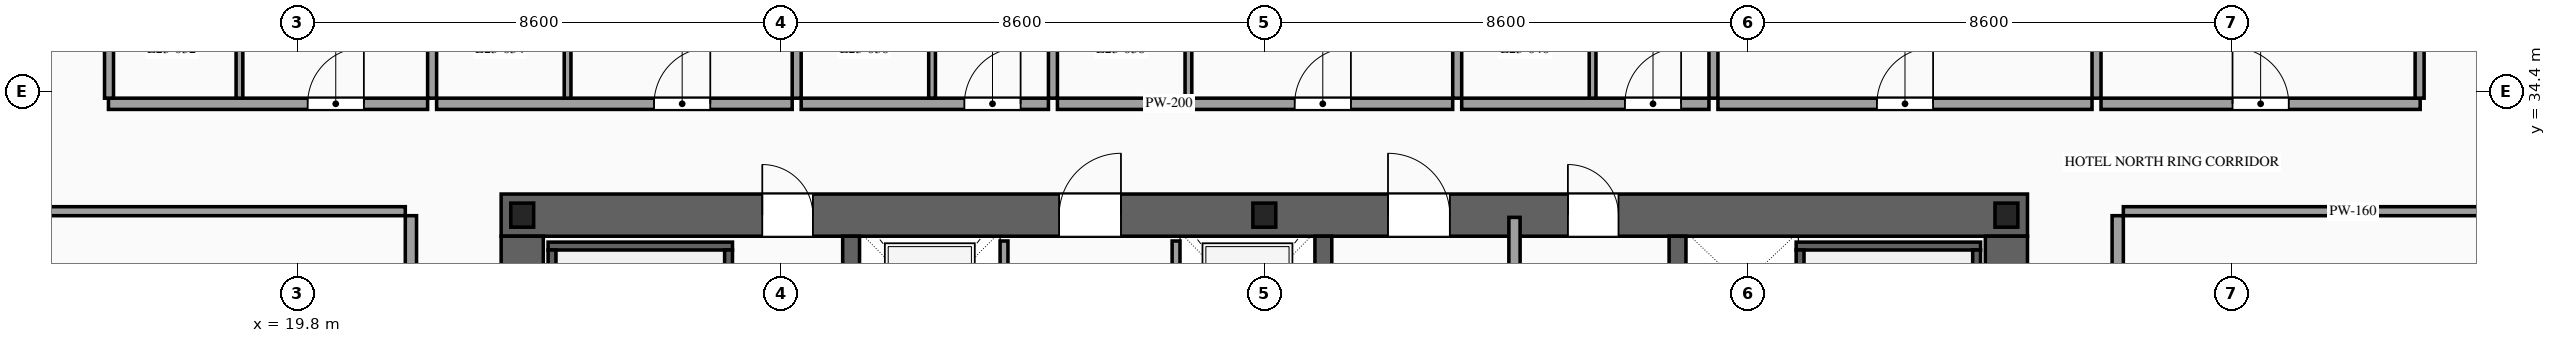
"""IFC4 building model, lengths in metres.
Left out: names, types, materials, properties, quantities, classifications, styles, units other than length and angle.
Written with IfcOpenShell. Run it as: python <this file> out.ifc"""

import sys

from ifc_helpers import new_model, si_unit, direction, frame, frame_2d, origin, origin_2d, place, context, subcontext, project, spatial, rectangle, i_section, extrude, source, transform, mapped, element, fill, save


model = new_model("IFC4")
c1 = context("Model", 3, precision=1e-05, world=origin(), true_north=direction((0.0, 1.0)))
c2 = subcontext(c1, "Body", "Model", "MODEL_VIEW")
j1 = project(units=[si_unit("LENGTHUNIT", "METRE"), si_unit("PLANEANGLEUNIT", "RADIAN")], contexts=[c1])
p1 = place(None, origin())
s1 = spatial("IfcSite", under=j1, at=p1, CompositionType="ELEMENT")
p2 = place(p1, origin())
s2 = spatial("IfcBuilding", under=s1, at=p2, CompositionType="ELEMENT")
p3 = place(p2, frame((0.0, 0.0, 90.2)))
s3 = spatial("IfcBuildingStorey", under=s2, at=p3, CompositionType="ELEMENT", Elevation=90.2)
p4 = place(p3, frame((23.425, 32.2, 0.0), z_axis=(0.0, 0.0, 1.0), x_axis=(1.0, 0.0, 0.0)))
e1 = element("IfcWall", 1, at=p4, inside=s3, PredefinedType="SHEAR", context=c2, shape_type="SweptSolid", body=[
    extrude(rectangle(XDim=27.15, YDim=0.75, at=frame_2d((13.575, 0.0))), origin(), (0.0, 0.0, 1.0), 3.6),
])
p5 = place(p4, frame((4.645, 0.0, 0.0)))
e2 = element("IfcOpeningElement", 2, at=p5, cuts=e1, PredefinedType="OPENING", context=c2, shape_type="SweptSolid", body=[
    extrude(rectangle(XDim=0.9, YDim=2.15, at=frame_2d((0.45, 1.075))), frame((0.0, 0.39, 0.0), z_axis=(0.0, -1.0, 0.0), x_axis=(1.0, 0.0, 0.0)), (0.0, 0.0, 1.0), 0.78),
])
p6 = place(p4, frame((9.925, 0.0, 0.0)))
e3 = element("IfcOpeningElement", 3, at=p6, cuts=e1, PredefinedType="OPENING", context=c2, shape_type="SweptSolid", body=[
    extrude(rectangle(XDim=1.1, YDim=2.2, at=frame_2d((0.55, 1.1))), frame((0.0, 0.39, 0.0), z_axis=(0.0, -1.0, 0.0), x_axis=(1.0, 0.0, 0.0)), (0.0, 0.0, 1.0), 0.78),
])
p7 = place(p4, frame((15.775, 0.0, 0.0)))
e4 = element("IfcOpeningElement", 4, at=p7, cuts=e1, PredefinedType="OPENING", context=c2, shape_type="SweptSolid", body=[
    extrude(rectangle(XDim=1.1, YDim=2.2, at=frame_2d((0.55, 1.1))), frame((0.0, 0.39, 0.0), z_axis=(0.0, -1.0, 0.0), x_axis=(1.0, 0.0, 0.0)), (0.0, 0.0, 1.0), 0.78),
])
p8 = place(p4, frame((18.975, 0.0, 0.0)))
e5 = element("IfcOpeningElement", 5, at=p8, cuts=e1, PredefinedType="OPENING", context=c2, shape_type="SweptSolid", body=[
    extrude(rectangle(XDim=0.9, YDim=2.15, at=frame_2d((0.45, 1.075))), frame((0.0, 0.39, 0.0), z_axis=(0.0, -1.0, 0.0), x_axis=(1.0, 0.0, 0.0)), (0.0, 0.0, 1.0), 0.78),
])
m1 = source(origin(), c2, "Body", "SweptSolid", [
    extrude(rectangle(XDim=12.05, YDim=0.75, at=frame_2d((6.025, 0.0))), origin(), (0.0, 0.0, 1.0), 3.6),
])
for number, where, z_axis, x_axis in (
    (6, (23.8, 19.775, 0.0), (0.0, 0.0, 1.0), (0.0, 1.0, 0.0)),
    (7, (50.2, 19.775, 0.0), (0.0, 0.0, 1.0), (0.0, 1.0, 0.0)),
):
    element("IfcWall", number, at=place(p3, frame(where, z_axis=z_axis, x_axis=x_axis)), inside=s3, PredefinedType="SHEAR", context=c2, shape_type="MappedRepresentation", body=[
        mapped(m1, transform((0.0, 0.0, 0.0), scale=1.0)),
    ])
m2 = source(origin(), c2, "Body", "SweptSolid", [
    extrude(rectangle(XDim=12.05, YDim=0.3, at=frame_2d((6.025, 0.0))), origin(), (0.0, 0.0, 1.0), 3.6),
])
for number, where, z_axis, x_axis in (
    (8, (29.65, 19.775, 0.0), (0.0, 0.0, 1.0), (0.0, 1.0, 0.0)),
    (9, (38.05, 19.775, 0.0), (0.0, 0.0, 1.0), (0.0, 1.0, 0.0)),
    (10, (44.35, 19.775, 0.0), (0.0, 0.0, 1.0), (0.0, 1.0, 0.0)),
):
    element("IfcWall", number, at=place(p3, frame(where, z_axis=z_axis, x_axis=x_axis)), inside=s3, PredefinedType="SOLIDWALL", context=c2, shape_type="MappedRepresentation", body=[
        mapped(m2, transform((0.0, 0.0, 0.0), scale=1.0)),
    ])
m3 = source(origin(), c2, "Body", "SweptSolid", [
    extrude(i_section(OverallWidth=0.407, OverallDepth=0.428, WebThickness=0.02, FlangeThickness=0.035, at=origin_2d()), origin(), (0.0, 0.0, 1.0), 3.6),
])
for number, where, z_axis, x_axis in (
    (11, (23.8, 32.2, 0.0), (0.0, 0.0, 1.0), (1.0, 0.0, 0.0)),
    (12, (37.0, 32.2, 0.0), (0.0, 0.0, 1.0), (1.0, 0.0, 0.0)),
    (13, (50.2, 32.2, 0.0), (0.0, 0.0, 1.0), (1.0, 0.0, 0.0)),
):
    element("IfcColumn", number, at=place(p3, frame(where, z_axis=z_axis, x_axis=x_axis)), inside=s3, PredefinedType="COLUMN", context=c2, shape_type="MappedRepresentation", body=[
        mapped(m3, transform((0.0, 0.0, 0.0), scale=1.0)),
    ])
p9 = place(p3, frame((32.37, 29.4, 0.0), z_axis=(0.0, 0.0, 1.0), x_axis=(0.0, 1.0, 0.0)))
e14 = element("IfcWall", 14, at=p9, inside=s3, PredefinedType="SOLIDWALL", context=c2, shape_type="SweptSolid", body=[
    extrude(rectangle(XDim=2.34, YDim=0.14, at=frame_2d((1.17, 0.0))), origin(), (0.0, 0.0, 1.0), 3.38),
])
p10 = place(p9, frame((0.62, 0.0, 0.0)))
e15 = element("IfcOpeningElement", 15, at=p10, cuts=e14, PredefinedType="OPENING", context=c2, shape_type="SweptSolid", body=[
    extrude(rectangle(XDim=1.1, YDim=2.2, at=frame_2d((0.55, 1.1))), frame((0.0, 0.085, 0.0), z_axis=(0.0, -1.0, 0.0), x_axis=(1.0, 0.0, 0.0)), (0.0, 0.0, 1.0), 0.17),
])
p11 = place(p3, frame((35.43, 29.4, 0.0), z_axis=(0.0, 0.0, 1.0), x_axis=(0.0, 1.0, 0.0)))
e16 = element("IfcWall", 16, at=p11, inside=s3, PredefinedType="SOLIDWALL", context=c2, shape_type="SweptSolid", body=[
    extrude(rectangle(XDim=2.34, YDim=0.14, at=frame_2d((1.17, 0.0))), origin(), (0.0, 0.0, 1.0), 3.38),
])
p12 = place(p11, frame((0.62, 0.0, 0.0)))
e17 = element("IfcOpeningElement", 17, at=p12, cuts=e16, PredefinedType="OPENING", context=c2, shape_type="SweptSolid", body=[
    extrude(rectangle(XDim=1.1, YDim=2.2, at=frame_2d((0.55, 1.1))), frame((0.0, 0.085, 0.0), z_axis=(0.0, -1.0, 0.0), x_axis=(1.0, 0.0, 0.0)), (0.0, 0.0, 1.0), 0.17),
])
m4 = source(origin(), c2, "Body", "SweptSolid", [
    extrude(rectangle(XDim=3.28, YDim=0.14, at=frame_2d((1.64, 0.0))), origin(), (0.0, 0.0, 1.0), 3.38),
])
p13 = place(p3, frame((24.26, 31.65, 0.0), z_axis=(0.0, 0.0, 1.0), x_axis=(1.0, 0.0, 0.0)))
e18 = element("IfcWall", 18, at=p13, inside=s3, PredefinedType="SOLIDWALL", context=c2, shape_type="MappedRepresentation", body=[
    mapped(m4, transform((0.0, 0.0, 0.0), scale=1.0)),
])
m5 = source(origin(), c2, "Body", "SweptSolid", [
    extrude(rectangle(XDim=8.94, YDim=0.14, at=frame_2d((4.47, 0.0))), origin(), (0.0, 0.0, 1.0), 3.38),
])
for number, where, z_axis, x_axis in (
    (19, (24.33, 22.64, 0.0), (0.0, 0.0, 1.0), (0.0, 1.0, 0.0)),
    (20, (27.47, 22.64, 0.0), (0.0, 0.0, 1.0), (0.0, 1.0, 0.0)),
):
    element("IfcWall", number, at=place(p3, frame(where, z_axis=z_axis, x_axis=x_axis)), inside=s3, PredefinedType="SOLIDWALL", context=c2, shape_type="MappedRepresentation", body=[
        mapped(m5, transform((0.0, 0.0, 0.0), scale=1.0)),
    ])
p14 = place(p3, frame((46.46, 31.65, 0.0), z_axis=(0.0, 0.0, 1.0), x_axis=(1.0, 0.0, 0.0)))
e21 = element("IfcWall", 21, at=p14, inside=s3, PredefinedType="SOLIDWALL", context=c2, shape_type="MappedRepresentation", body=[
    mapped(m4, transform((0.0, 0.0, 0.0), scale=1.0)),
])
for number, where, z_axis, x_axis in (
    (22, (46.53, 22.64, 0.0), (0.0, 0.0, 1.0), (0.0, 1.0, 0.0)),
    (23, (49.67, 22.64, 0.0), (0.0, 0.0, 1.0), (0.0, 1.0, 0.0)),
):
    element("IfcWall", number, at=place(p3, frame(where, z_axis=z_axis, x_axis=x_axis)), inside=s3, PredefinedType="SOLIDWALL", context=c2, shape_type="MappedRepresentation", body=[
        mapped(m5, transform((0.0, 0.0, 0.0), scale=1.0)),
    ])
m6 = source(origin(), c2, "Body", "SweptSolid", [
    extrude(rectangle(XDim=5.96, YDim=0.2, at=frame_2d((2.98, 0.0))), origin(), (0.0, 0.0, 1.0), 3.38),
])
p15 = place(p3, frame((41.45, 26.2, 0.0), z_axis=(0.0, 0.0, 1.0), x_axis=(0.0, 1.0, 0.0)))
e24 = element("IfcWall", 24, at=p15, inside=s3, PredefinedType="PARTITIONING", context=c2, shape_type="MappedRepresentation", body=[
    mapped(m6, transform((0.0, 0.0, 0.0), scale=1.0)),
])
p16 = place(p3, frame((16.44, 34.18, 0.0), z_axis=(0.0, 0.0, 1.0), x_axis=(1.0, 0.0, 0.0)))
e25 = element("IfcWall", 25, at=p16, inside=s3, PredefinedType="PARTITIONING", context=c2, shape_type="SweptSolid", body=[
    extrude(rectangle(XDim=5.677, YDim=0.2, at=frame_2d((2.838, 0.0))), origin(), (0.0, 0.0, 1.0), 3.38),
])
p17 = place(p16, frame((3.543, 0.0, 0.0)))
e26 = element("IfcOpeningElement", 26, at=p17, cuts=e25, PredefinedType="OPENING", context=c2, shape_type="SweptSolid", body=[
    extrude(rectangle(XDim=1.0, YDim=2.2, at=frame_2d((0.5, 1.1))), frame((0.0, 0.115, 0.0), z_axis=(0.0, -1.0, 0.0), x_axis=(1.0, 0.0, 0.0)), (0.0, 0.0, 1.0), 0.23),
])
m7 = source(origin(), c2, "Body", "SweptSolid", [
    extrude(rectangle(XDim=14.97, YDim=0.16, at=frame_2d((7.485, 0.0))), origin(), (0.0, 0.0, 1.0), 3.38),
])
p18 = place(p3, frame((22.197, 34.28, 0.0), z_axis=(0.0, 0.0, 1.0), x_axis=(0.0, 1.0, 0.0)))
e27 = element("IfcWall", 27, at=p18, inside=s3, PredefinedType="PARTITIONING", context=c2, shape_type="MappedRepresentation", body=[
    mapped(m7, transform((0.0, 0.0, 0.0), scale=1.0)),
])
m8 = source(origin(), c2, "Body", "SweptSolid", [
    extrude(rectangle(XDim=2.42, YDim=0.12, at=frame_2d((1.21, 0.0))), origin(), (0.0, 0.0, 1.0), 3.38),
])
p19 = place(p3, frame((18.77, 34.28, 0.0), z_axis=(0.0, 0.0, 1.0), x_axis=(0.0, 1.0, 0.0)))
e28 = element("IfcWall", 28, at=p19, inside=s3, PredefinedType="PARTITIONING", context=c2, shape_type="MappedRepresentation", body=[
    mapped(m8, transform((0.0, 0.0, 0.0), scale=1.0)),
])
p20 = place(p3, frame((22.277, 34.18, 0.0), z_axis=(0.0, 0.0, 1.0), x_axis=(1.0, 0.0, 0.0)))
e29 = element("IfcWall", 29, at=p20, inside=s3, PredefinedType="PARTITIONING", context=c2, shape_type="SweptSolid", body=[
    extrude(rectangle(XDim=6.325, YDim=0.2, at=frame_2d((3.163, 0.0))), origin(), (0.0, 0.0, 1.0), 3.38),
])
p21 = place(p20, frame((3.868, 0.0, 0.0)))
e30 = element("IfcOpeningElement", 30, at=p21, cuts=e29, PredefinedType="OPENING", context=c2, shape_type="SweptSolid", body=[
    extrude(rectangle(XDim=1.0, YDim=2.2, at=frame_2d((0.5, 1.1))), frame((0.0, 0.115, 0.0), z_axis=(0.0, -1.0, 0.0), x_axis=(1.0, 0.0, 0.0)), (0.0, 0.0, 1.0), 0.23),
])
p22 = place(p3, frame((28.682, 34.28, 0.0), z_axis=(0.0, 0.0, 1.0), x_axis=(0.0, 1.0, 0.0)))
e31 = element("IfcWall", 31, at=p22, inside=s3, PredefinedType="PARTITIONING", context=c2, shape_type="MappedRepresentation", body=[
    mapped(m7, transform((0.0, 0.0, 0.0), scale=1.0)),
])
p23 = place(p3, frame((24.607, 34.28, 0.0), z_axis=(0.0, 0.0, 1.0), x_axis=(0.0, 1.0, 0.0)))
e32 = element("IfcWall", 32, at=p23, inside=s3, PredefinedType="PARTITIONING", context=c2, shape_type="MappedRepresentation", body=[
    mapped(m8, transform((0.0, 0.0, 0.0), scale=1.0)),
])
p24 = place(p3, frame((28.762, 34.18, 0.0), z_axis=(0.0, 0.0, 1.0), x_axis=(1.0, 0.0, 0.0)))
e33 = element("IfcWall", 33, at=p24, inside=s3, PredefinedType="PARTITIONING", context=c2, shape_type="SweptSolid", body=[
    extrude(rectangle(XDim=4.398, YDim=0.2, at=frame_2d((2.199, 0.0))), origin(), (0.0, 0.0, 1.0), 3.38),
])
p25 = place(p24, frame((2.903, 0.0, 0.0)))
e34 = element("IfcOpeningElement", 34, at=p25, cuts=e33, PredefinedType="OPENING", context=c2, shape_type="SweptSolid", body=[
    extrude(rectangle(XDim=1.0, YDim=2.2, at=frame_2d((0.5, 1.1))), frame((0.0, 0.115, 0.0), z_axis=(0.0, -1.0, 0.0), x_axis=(1.0, 0.0, 0.0)), (0.0, 0.0, 1.0), 0.23),
])
p26 = place(p3, frame((33.24, 34.28, 0.0), z_axis=(0.0, 0.0, 1.0), x_axis=(0.0, 1.0, 0.0)))
e35 = element("IfcWall", 35, at=p26, inside=s3, PredefinedType="PARTITIONING", context=c2, shape_type="MappedRepresentation", body=[
    mapped(m7, transform((0.0, 0.0, 0.0), scale=1.0)),
])
p27 = place(p3, frame((31.09, 34.28, 0.0), z_axis=(0.0, 0.0, 1.0), x_axis=(0.0, 1.0, 0.0)))
e36 = element("IfcWall", 36, at=p27, inside=s3, PredefinedType="PARTITIONING", context=c2, shape_type="MappedRepresentation", body=[
    mapped(m8, transform((0.0, 0.0, 0.0), scale=1.0)),
])
p28 = place(p3, frame((33.32, 34.18, 0.0), z_axis=(0.0, 0.0, 1.0), x_axis=(1.0, 0.0, 0.0)))
e37 = element("IfcWall", 37, at=p28, inside=s3, PredefinedType="PARTITIONING", context=c2, shape_type="SweptSolid", body=[
    extrude(rectangle(XDim=7.031, YDim=0.2, at=frame_2d((3.516, 0.0))), origin(), (0.0, 0.0, 1.0), 3.38),
])
p29 = place(p28, frame((4.22, 0.0, 0.0)))
e38 = element("IfcOpeningElement", 38, at=p29, cuts=e37, PredefinedType="OPENING", context=c2, shape_type="SweptSolid", body=[
    extrude(rectangle(XDim=1.0, YDim=2.2, at=frame_2d((0.5, 1.1))), frame((0.0, 0.115, 0.0), z_axis=(0.0, -1.0, 0.0), x_axis=(1.0, 0.0, 0.0)), (0.0, 0.0, 1.0), 0.23),
])
p30 = place(p3, frame((40.431, 34.28, 0.0), z_axis=(0.0, 0.0, 1.0), x_axis=(0.0, 1.0, 0.0)))
e39 = element("IfcWall", 39, at=p30, inside=s3, PredefinedType="PARTITIONING", context=c2, shape_type="MappedRepresentation", body=[
    mapped(m7, transform((0.0, 0.0, 0.0), scale=1.0)),
])
p31 = place(p3, frame((35.65, 34.28, 0.0), z_axis=(0.0, 0.0, 1.0), x_axis=(0.0, 1.0, 0.0)))
e40 = element("IfcWall", 40, at=p31, inside=s3, PredefinedType="PARTITIONING", context=c2, shape_type="MappedRepresentation", body=[
    mapped(m8, transform((0.0, 0.0, 0.0), scale=1.0)),
])
p32 = place(p3, frame((40.511, 34.18, 0.0), z_axis=(0.0, 0.0, 1.0), x_axis=(1.0, 0.0, 0.0)))
e41 = element("IfcWall", 41, at=p32, inside=s3, PredefinedType="PARTITIONING", context=c2, shape_type="SweptSolid", body=[
    extrude(rectangle(XDim=4.398, YDim=0.2, at=frame_2d((2.199, 0.0))), origin(), (0.0, 0.0, 1.0), 3.38),
])
p33 = place(p32, frame((2.903, 0.0, 0.0)))
e42 = element("IfcOpeningElement", 42, at=p33, cuts=e41, PredefinedType="OPENING", context=c2, shape_type="SweptSolid", body=[
    extrude(rectangle(XDim=1.0, YDim=2.2, at=frame_2d((0.5, 1.1))), frame((0.0, 0.115, 0.0), z_axis=(0.0, -1.0, 0.0), x_axis=(1.0, 0.0, 0.0)), (0.0, 0.0, 1.0), 0.23),
])
p34 = place(p3, frame((44.989, 34.28, 0.0), z_axis=(0.0, 0.0, 1.0), x_axis=(0.0, 1.0, 0.0)))
e43 = element("IfcWall", 43, at=p34, inside=s3, PredefinedType="PARTITIONING", context=c2, shape_type="MappedRepresentation", body=[
    mapped(m7, transform((0.0, 0.0, 0.0), scale=1.0)),
])
p35 = place(p3, frame((42.839, 34.28, 0.0), z_axis=(0.0, 0.0, 1.0), x_axis=(0.0, 1.0, 0.0)))
e44 = element("IfcWall", 44, at=p35, inside=s3, PredefinedType="PARTITIONING", context=c2, shape_type="MappedRepresentation", body=[
    mapped(m8, transform((0.0, 0.0, 0.0), scale=1.0)),
])
p36 = place(p3, frame((45.069, 34.18, 0.0), z_axis=(0.0, 0.0, 1.0), x_axis=(1.0, 0.0, 0.0)))
e45 = element("IfcWall", 45, at=p36, inside=s3, PredefinedType="PARTITIONING", context=c2, shape_type="SweptSolid", body=[
    extrude(rectangle(XDim=6.654, YDim=0.2, at=frame_2d((3.327, 0.0))), origin(), (0.0, 0.0, 1.0), 3.38),
])
p37 = place(p36, frame((2.827, 0.0, 0.0)))
e46 = element("IfcOpeningElement", 46, at=p37, cuts=e45, PredefinedType="OPENING", context=c2, shape_type="SweptSolid", body=[
    extrude(rectangle(XDim=1.0, YDim=2.2, at=frame_2d((0.5, 1.1))), frame((0.0, 0.115, 0.0), z_axis=(0.0, -1.0, 0.0), x_axis=(1.0, 0.0, 0.0)), (0.0, 0.0, 1.0), 0.23),
])
p38 = place(p3, frame((51.803, 34.28, 0.0), z_axis=(0.0, 0.0, 1.0), x_axis=(0.0, 1.0, 0.0)))
e47 = element("IfcWall", 47, at=p38, inside=s3, PredefinedType="PARTITIONING", context=c2, shape_type="MappedRepresentation", body=[
    mapped(m7, transform((0.0, 0.0, 0.0), scale=1.0)),
])
p39 = place(p3, frame((51.883, 34.18, 0.0), z_axis=(0.0, 0.0, 1.0), x_axis=(1.0, 0.0, 0.0)))
e48 = element("IfcWall", 48, at=p39, inside=s3, PredefinedType="PARTITIONING", context=c2, shape_type="SweptSolid", body=[
    extrude(rectangle(XDim=5.677, YDim=0.2, at=frame_2d((2.838, 0.0))), origin(), (0.0, 0.0, 1.0), 3.38),
])
p40 = place(p39, frame((2.339, 0.0, 0.0)))
e49 = element("IfcOpeningElement", 49, at=p40, cuts=e48, PredefinedType="OPENING", context=c2, shape_type="SweptSolid", body=[
    extrude(rectangle(XDim=1.0, YDim=2.2, at=frame_2d((0.5, 1.1))), frame((0.0, 0.115, 0.0), z_axis=(0.0, -1.0, 0.0), x_axis=(1.0, 0.0, 0.0)), (0.0, 0.0, 1.0), 0.23),
])
m9 = source(origin(), c2, "Body", "SweptSolid", [
    extrude(rectangle(XDim=14.82, YDim=0.16, at=frame_2d((7.41, 0.0))), origin(), (0.0, 0.0, 1.0), 3.38),
])
for number, where, z_axis, x_axis in (
    (50, (16.45, 34.28, 0.0), (0.0, 0.0, 1.0), (0.0, 1.0, 0.0)),
    (51, (57.55, 34.28, 0.0), (0.0, 0.0, 1.0), (0.0, 1.0, 0.0)),
):
    element("IfcWall", number, at=place(p3, frame(where, z_axis=z_axis, x_axis=x_axis)), inside=s3, PredefinedType="PARTITIONING", context=c2, shape_type="MappedRepresentation", body=[
        mapped(m9, transform((0.0, 0.0, 0.0), scale=1.0)),
    ])
p41 = place(p3, frame((21.82, 25.88, 0.0), z_axis=(0.0, 0.0, 1.0), x_axis=(0.0, 1.0, 0.0)))
e52 = element("IfcWall", 52, at=p41, inside=s3, PredefinedType="PARTITIONING", context=c2, shape_type="SweptSolid", body=[
    extrude(rectangle(XDim=6.31, YDim=0.2, at=frame_2d((3.155, 0.0))), origin(), (0.0, 0.0, 1.0), 3.38),
])
p42 = place(p41, frame((3.835, 0.0, 0.0)))
e53 = element("IfcOpeningElement", 53, at=p42, cuts=e52, PredefinedType="OPENING", context=c2, shape_type="SweptSolid", body=[
    extrude(rectangle(XDim=1.0, YDim=2.2, at=frame_2d((0.5, 1.1))), frame((0.0, 0.115, 0.0), z_axis=(0.0, -1.0, 0.0), x_axis=(1.0, 0.0, 0.0)), (0.0, 0.0, 1.0), 0.23),
])
m10 = source(origin(), c2, "Body", "SweptSolid", [
    extrude(rectangle(XDim=8.17, YDim=0.16, at=frame_2d((4.085, 0.0))), origin(), (0.0, 0.0, 1.0), 2.875),
])
p43 = place(p3, frame((13.55, 32.27, 0.0), z_axis=(0.0, 0.0, 1.0), x_axis=(1.0, 0.0, 0.0)))
e54 = element("IfcWall", 54, at=p43, inside=s3, PredefinedType="PARTITIONING", context=c2, shape_type="MappedRepresentation", body=[
    mapped(m10, transform((0.0, 0.0, 0.0), scale=1.0)),
])
p44 = place(p3, frame((52.18, 25.88, 0.0), z_axis=(0.0, 0.0, 1.0), x_axis=(0.0, 1.0, 0.0)))
e55 = element("IfcWall", 55, at=p44, inside=s3, PredefinedType="PARTITIONING", context=c2, shape_type="SweptSolid", body=[
    extrude(rectangle(XDim=6.31, YDim=0.2, at=frame_2d((3.155, 0.0))), origin(), (0.0, 0.0, 1.0), 3.38),
])
p45 = place(p44, frame((3.835, 0.0, 0.0)))
e56 = element("IfcOpeningElement", 56, at=p45, cuts=e55, PredefinedType="OPENING", context=c2, shape_type="SweptSolid", body=[
    extrude(rectangle(XDim=1.0, YDim=2.2, at=frame_2d((0.5, 1.1))), frame((0.0, 0.115, 0.0), z_axis=(0.0, -1.0, 0.0), x_axis=(1.0, 0.0, 0.0)), (0.0, 0.0, 1.0), 0.23),
])
p46 = place(p3, frame((52.28, 32.27, 0.0), z_axis=(0.0, 0.0, 1.0), x_axis=(1.0, 0.0, 0.0)))
e57 = element("IfcWall", 57, at=p46, inside=s3, PredefinedType="PARTITIONING", context=c2, shape_type="MappedRepresentation", body=[
    mapped(m10, transform((0.0, 0.0, 0.0), scale=1.0)),
])
m11 = source(origin(), c2, "Body", "SweptSolid", [
    extrude(rectangle(XDim=0.9, YDim=2.15, at=frame_2d((0.45, 1.075))), frame((0.0, 0.025, 0.0), z_axis=(0.0, -1.0, 0.0), x_axis=(1.0, 0.0, 0.0)), (0.0, 0.0, 1.0), 0.05),
])
p47 = place(p5, origin())
e58 = element("IfcDoor", 58, at=p47, inside=s3, OperationType="SINGLE_SWING_LEFT", PredefinedType="DOOR", context=c2, shape_type="MappedRepresentation", body=[
    mapped(m11, transform((0.0, 0.0, 0.0), scale=1.0)),
])
fill(e2, e58)
m12 = source(origin(), c2, "Body", "SweptSolid", [
    extrude(rectangle(XDim=1.1, YDim=2.2, at=frame_2d((0.55, 1.1))), frame((0.0, 0.025, 0.0), z_axis=(0.0, -1.0, 0.0), x_axis=(1.0, 0.0, 0.0)), (0.0, 0.0, 1.0), 0.05),
])
p48 = place(p6, origin())
e59 = element("IfcDoor", 59, at=p48, inside=s3, OperationType="SINGLE_SWING_RIGHT", PredefinedType="DOOR", context=c2, shape_type="MappedRepresentation", body=[
    mapped(m12, transform((0.0, 0.0, 0.0), scale=1.0)),
])
fill(e3, e59)
p49 = place(p7, origin())
e60 = element("IfcDoor", 60, at=p49, inside=s3, OperationType="SINGLE_SWING_LEFT", PredefinedType="DOOR", context=c2, shape_type="MappedRepresentation", body=[
    mapped(m12, transform((0.0, 0.0, 0.0), scale=1.0)),
])
fill(e4, e60)
p50 = place(p8, origin())
e61 = element("IfcDoor", 61, at=p50, inside=s3, OperationType="SINGLE_SWING_LEFT", PredefinedType="DOOR", context=c2, shape_type="MappedRepresentation", body=[
    mapped(m11, transform((0.0, 0.0, 0.0), scale=1.0)),
])
fill(e5, e61)
m13 = source(origin(), c2, "Body", "SweptSolid", [
    extrude(rectangle(XDim=1.0, YDim=2.2, at=frame_2d((0.5, 1.1))), frame((0.0, 0.025, 0.0), z_axis=(0.0, -1.0, 0.0), x_axis=(1.0, 0.0, 0.0)), (0.0, 0.0, 1.0), 0.05),
])
p51 = place(p17, origin())
e62 = element("IfcDoor", 62, at=p51, inside=s3, OperationType="SINGLE_SWING_RIGHT", PredefinedType="DOOR", context=c2, shape_type="MappedRepresentation", body=[
    mapped(m13, transform((0.0, 0.0, 0.0), scale=1.0)),
])
fill(e26, e62)
p52 = place(p21, origin())
e63 = element("IfcDoor", 63, at=p52, inside=s3, OperationType="SINGLE_SWING_RIGHT", PredefinedType="DOOR", context=c2, shape_type="MappedRepresentation", body=[
    mapped(m13, transform((0.0, 0.0, 0.0), scale=1.0)),
])
fill(e30, e63)
p53 = place(p25, origin())
e64 = element("IfcDoor", 64, at=p53, inside=s3, OperationType="SINGLE_SWING_RIGHT", PredefinedType="DOOR", context=c2, shape_type="MappedRepresentation", body=[
    mapped(m13, transform((0.0, 0.0, 0.0), scale=1.0)),
])
fill(e34, e64)
p54 = place(p29, origin())
e65 = element("IfcDoor", 65, at=p54, inside=s3, OperationType="SINGLE_SWING_RIGHT", PredefinedType="DOOR", context=c2, shape_type="MappedRepresentation", body=[
    mapped(m13, transform((0.0, 0.0, 0.0), scale=1.0)),
])
fill(e38, e65)
p55 = place(p33, origin())
e66 = element("IfcDoor", 66, at=p55, inside=s3, OperationType="SINGLE_SWING_RIGHT", PredefinedType="DOOR", context=c2, shape_type="MappedRepresentation", body=[
    mapped(m13, transform((0.0, 0.0, 0.0), scale=1.0)),
])
fill(e42, e66)
p56 = place(p37, origin())
e67 = element("IfcDoor", 67, at=p56, inside=s3, OperationType="SINGLE_SWING_RIGHT", PredefinedType="DOOR", context=c2, shape_type="MappedRepresentation", body=[
    mapped(m13, transform((0.0, 0.0, 0.0), scale=1.0)),
])
fill(e46, e67)
p57 = place(p40, origin())
e68 = element("IfcDoor", 68, at=p57, inside=s3, OperationType="SINGLE_SWING_LEFT", PredefinedType="DOOR", context=c2, shape_type="MappedRepresentation", body=[
    mapped(m13, transform((0.0, 0.0, 0.0), scale=1.0)),
])
fill(e49, e68)
save(model, sys.argv[1])
